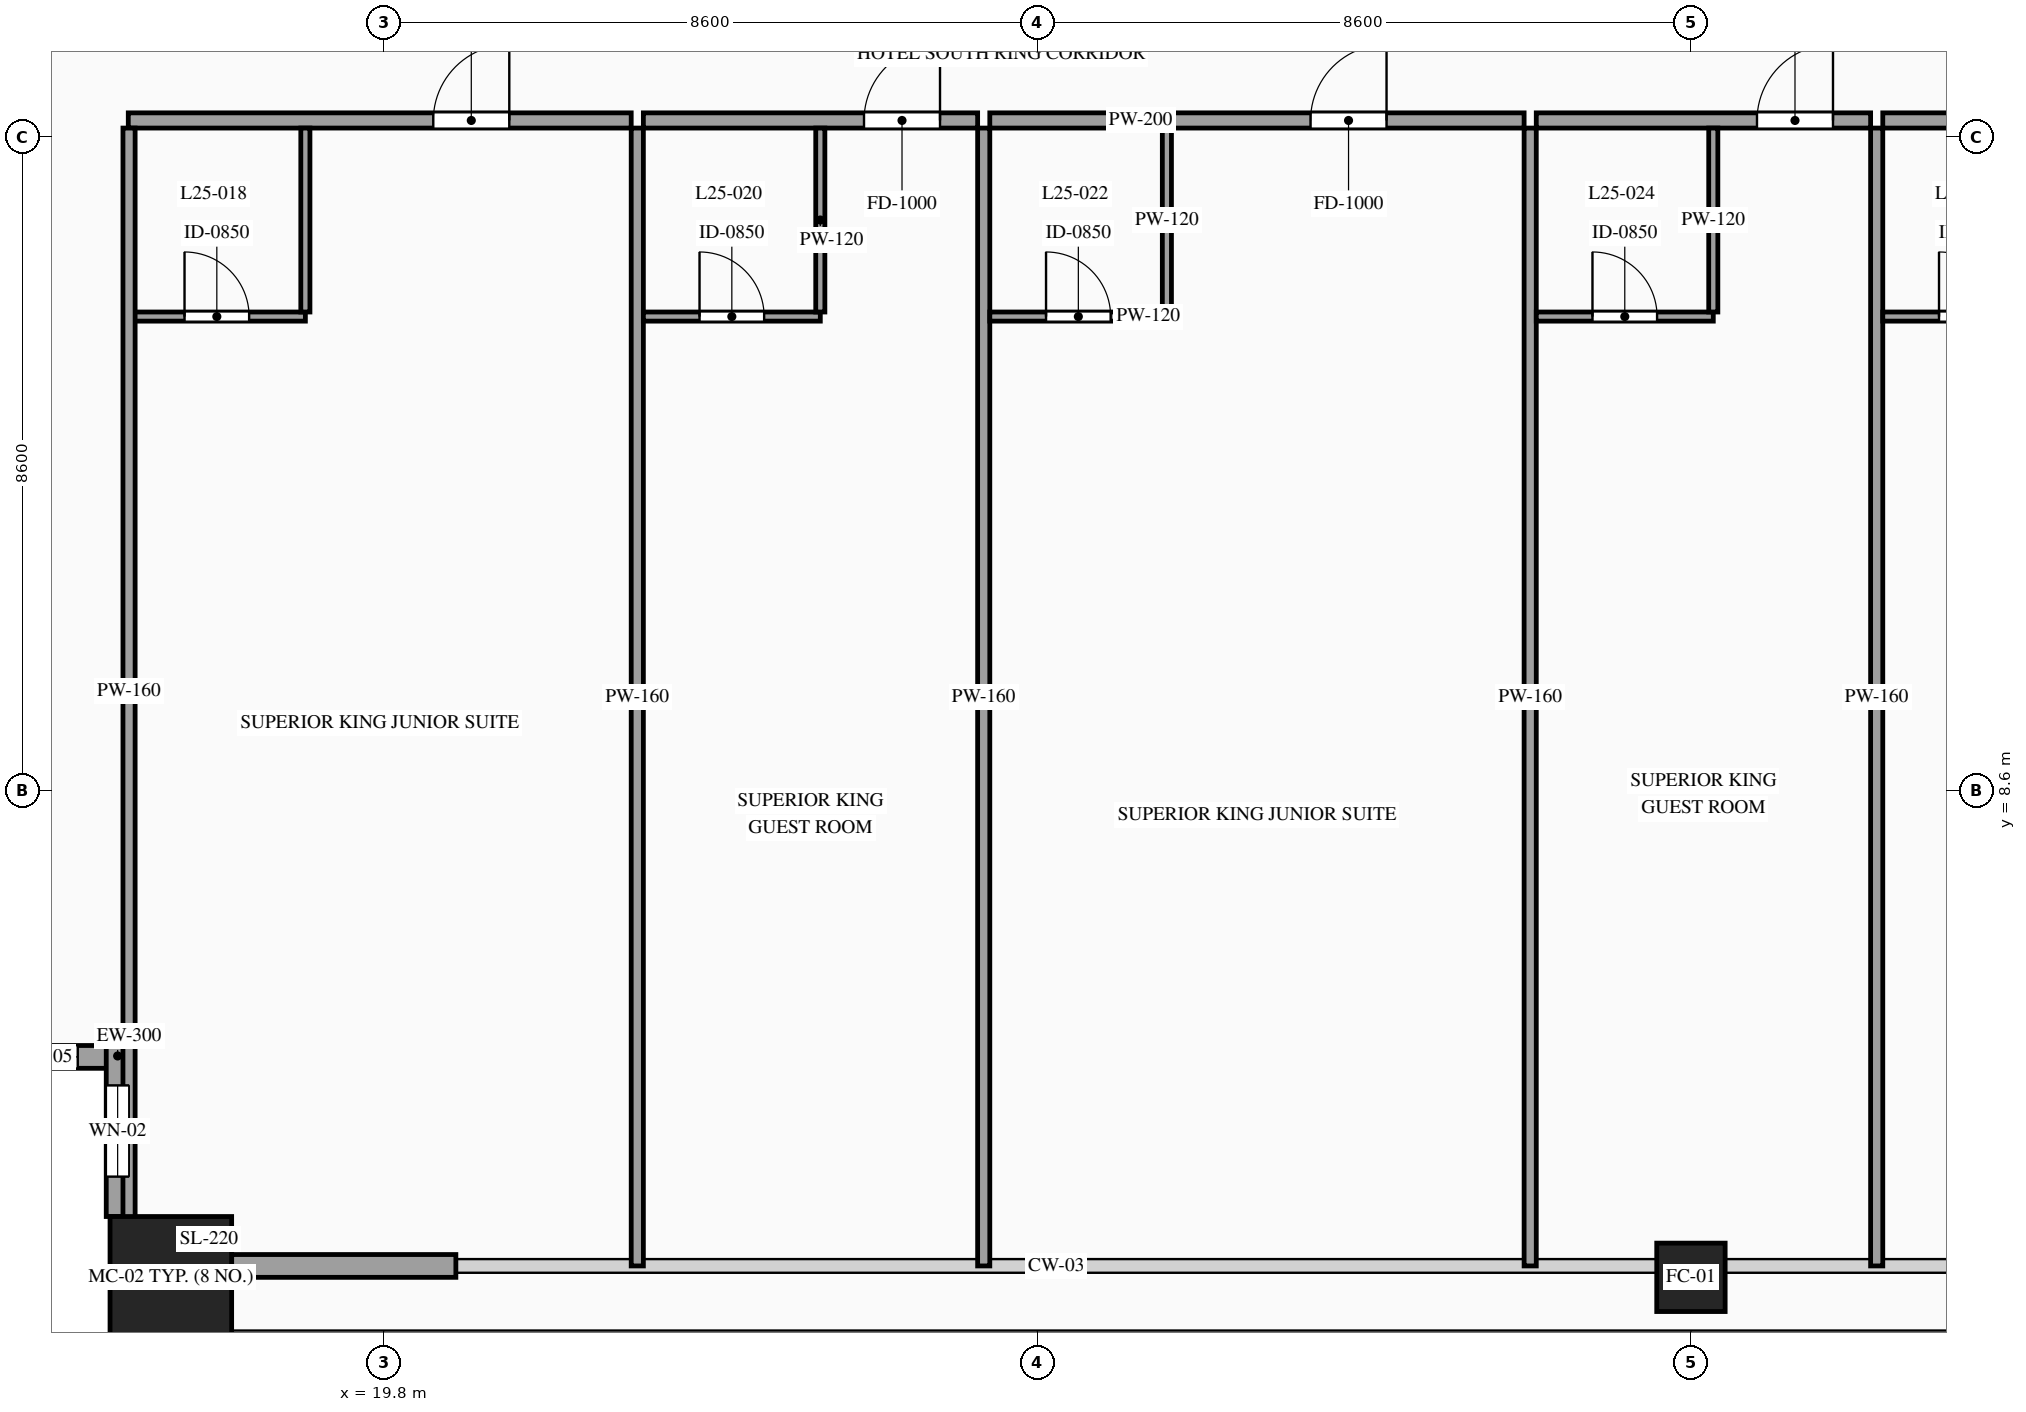
"""IFC4 building model, lengths in metres.
Left out: names, types, materials, properties, quantities, classifications, styles, units other than length and angle.
Written with IfcOpenShell. Run it as: python <this file> out.ifc"""

import sys

from ifc_helpers import new_model, si_unit, direction, frame, frame_2d, origin, origin_2d, place, context, subcontext, project, spatial, rectangle, hollow_rectangle, extrude, source, transform, mapped, element, fill, save


model = new_model("IFC4")
c1 = context("Model", 3, precision=1e-05, world=origin(), true_north=direction((0.0, 1.0)))
c2 = subcontext(c1, "Body", "Model", "MODEL_VIEW")
j1 = project(units=[si_unit("LENGTHUNIT", "METRE"), si_unit("PLANEANGLEUNIT", "RADIAN")], contexts=[c1])
p1 = place(None, origin())
s1 = spatial("IfcSite", under=j1, at=p1, CompositionType="ELEMENT")
p2 = place(p1, origin())
s2 = spatial("IfcBuilding", under=s1, at=p2, CompositionType="ELEMENT")
p3 = place(p2, frame((0.0, 0.0, 97.4)))
s3 = spatial("IfcBuildingStorey", under=s2, at=p3, CompositionType="ELEMENT", Elevation=97.4)
m1 = source(origin(), c2, "Body", "SweptSolid", [
    extrude(hollow_rectangle(XDim=1.6, YDim=1.6, WallThickness=0.07, at=origin_2d()), origin(), (0.0, 0.0, 1.0), 3.6),
])
p4 = place(p3, frame((17.0, 2.2, 0.0), z_axis=(0.0, 0.0, 1.0), x_axis=(1.0, 0.0, 0.0)))
e1 = element("IfcColumn", 1, at=p4, inside=s3, PredefinedType="COLUMN", context=c2, shape_type="MappedRepresentation", body=[
    mapped(m1, transform((0.0, 0.0, 0.0), scale=1.0)),
])
m2 = source(origin(), c2, "Body", "SweptSolid", [
    extrude(hollow_rectangle(XDim=0.9, YDim=0.9, WallThickness=0.042, at=origin_2d()), origin(), (0.0, 0.0, 1.0), 3.6),
])
p5 = place(p3, frame((37.0, 2.2, 0.0), z_axis=(0.0, 0.0, 1.0), x_axis=(1.0, 0.0, 0.0)))
e2 = element("IfcColumn", 2, at=p5, inside=s3, PredefinedType="COLUMN", context=c2, shape_type="MappedRepresentation", body=[
    mapped(m2, transform((0.0, 0.0, 0.0), scale=1.0)),
])
p6 = place(p3, frame((14.2, 5.1, 0.0), z_axis=(0.0, 0.0, 1.0), x_axis=(1.0, 0.0, 0.0)))
e3 = element("IfcWall", 3, at=p6, inside=s3, PredefinedType="SOLIDWALL", context=c2, shape_type="SweptSolid", body=[
    extrude(rectangle(XDim=2.25, YDim=0.3, at=frame_2d((1.125, 0.0))), origin(), (0.0, 0.0, 1.0), 3.38),
])
p7 = place(p6, frame((0.675, 0.0, 0.85)))
e4 = element("IfcOpeningElement", 4, at=p7, cuts=e3, PredefinedType="OPENING", context=c2, shape_type="SweptSolid", body=[
    extrude(rectangle(XDim=0.9, YDim=1.5, at=frame_2d((0.45, 0.75))), frame((0.0, 0.165, 0.0), z_axis=(0.0, -1.0, 0.0), x_axis=(1.0, 0.0, 0.0)), (0.0, 0.0, 1.0), 0.33),
])
p8 = place(p3, frame((16.3, 5.25, 0.0), z_axis=(0.0, 0.0, 1.0), x_axis=(0.0, -1.0, 0.0)))
e5 = element("IfcWall", 5, at=p8, inside=s3, PredefinedType="SOLIDWALL", context=c2, shape_type="SweptSolid", body=[
    extrude(rectangle(XDim=2.25, YDim=0.3, at=frame_2d((1.125, 0.0))), origin(), (0.0, 0.0, 1.0), 3.38),
])
p9 = place(p8, frame((0.525, 0.0, 0.85)))
e6 = element("IfcOpeningElement", 6, at=p9, cuts=e5, PredefinedType="OPENING", context=c2, shape_type="SweptSolid", body=[
    extrude(rectangle(XDim=1.2, YDim=2.1, at=frame_2d((0.6, 1.05))), frame((0.0, 0.165, 0.0), z_axis=(0.0, -1.0, 0.0), x_axis=(1.0, 0.0, 0.0)), (0.0, 0.0, 1.0), 0.33),
])
m3 = source(origin(), c2, "Body", "SweptSolid", [
    extrude(rectangle(XDim=2.95, YDim=0.3, at=frame_2d((1.475, 0.0))), origin(), (0.0, 0.0, 1.0), 2.775),
])
p10 = place(p3, frame((17.8, 2.35, 0.0), z_axis=(0.0, 0.0, 1.0), x_axis=(1.0, 0.0, 0.0)))
e7 = element("IfcWall", 7, at=p10, inside=s3, PredefinedType="SOLIDWALL", context=c2, shape_type="MappedRepresentation", body=[
    mapped(m3, transform((0.0, 0.0, 0.0), scale=1.0)),
])
p11 = place(p3, frame((16.44, 17.42, 0.0), z_axis=(0.0, 0.0, 1.0), x_axis=(1.0, 0.0, 0.0)))
e8 = element("IfcWall", 8, at=p11, inside=s3, PredefinedType="PARTITIONING", context=c2, shape_type="SweptSolid", body=[
    extrude(rectangle(XDim=6.617, YDim=0.2, at=frame_2d((3.309, 0.0))), origin(), (0.0, 0.0, 1.0), 3.38),
])
p12 = place(p11, frame((4.013, 0.0, 0.0)))
e9 = element("IfcOpeningElement", 9, at=p12, cuts=e8, PredefinedType="OPENING", context=c2, shape_type="SweptSolid", body=[
    extrude(rectangle(XDim=1.0, YDim=2.2, at=frame_2d((0.5, 1.1))), frame((0.0, 0.115, 0.0), z_axis=(0.0, -1.0, 0.0), x_axis=(1.0, 0.0, 0.0)), (0.0, 0.0, 1.0), 0.23),
])
m4 = source(origin(), c2, "Body", "SweptSolid", [
    extrude(rectangle(XDim=14.97, YDim=0.16, at=frame_2d((7.485, 0.0))), origin(), (0.0, 0.0, 1.0), 3.38),
])
p13 = place(p3, frame((23.137, 2.35, 0.0), z_axis=(0.0, 0.0, 1.0), x_axis=(0.0, 1.0, 0.0)))
e10 = element("IfcWall", 10, at=p13, inside=s3, PredefinedType="PARTITIONING", context=c2, shape_type="MappedRepresentation", body=[
    mapped(m4, transform((0.0, 0.0, 0.0), scale=1.0)),
])
p14 = place(p3, frame((16.44, 14.84, 0.0), z_axis=(0.0, 0.0, 1.0), x_axis=(1.0, 0.0, 0.0)))
e11 = element("IfcWall", 11, at=p14, inside=s3, PredefinedType="PARTITIONING", context=c2, shape_type="SweptSolid", body=[
    extrude(rectangle(XDim=2.33, YDim=0.12, at=frame_2d((1.165, 0.0))), origin(), (0.0, 0.0, 1.0), 3.38),
])
p15 = place(p14, frame((0.74, 0.0, 0.0)))
e12 = element("IfcOpeningElement", 12, at=p15, cuts=e11, PredefinedType="OPENING", context=c2, shape_type="SweptSolid", body=[
    extrude(rectangle(XDim=0.85, YDim=2.1, at=frame_2d((0.425, 1.05))), frame((0.0, 0.075, 0.0), z_axis=(0.0, -1.0, 0.0), x_axis=(1.0, 0.0, 0.0)), (0.0, 0.0, 1.0), 0.15),
])
m5 = source(origin(), c2, "Body", "SweptSolid", [
    extrude(rectangle(XDim=2.42, YDim=0.12, at=frame_2d((1.21, 0.0))), origin(), (0.0, 0.0, 1.0), 3.38),
])
p16 = place(p3, frame((18.77, 14.9, 0.0), z_axis=(0.0, 0.0, 1.0), x_axis=(0.0, 1.0, 0.0)))
e13 = element("IfcWall", 13, at=p16, inside=s3, PredefinedType="PARTITIONING", context=c2, shape_type="MappedRepresentation", body=[
    mapped(m5, transform((0.0, 0.0, 0.0), scale=1.0)),
])
p17 = place(p3, frame((23.217, 17.42, 0.0), z_axis=(0.0, 0.0, 1.0), x_axis=(1.0, 0.0, 0.0)))
e14 = element("IfcWall", 14, at=p17, inside=s3, PredefinedType="PARTITIONING", context=c2, shape_type="SweptSolid", body=[
    extrude(rectangle(XDim=4.398, YDim=0.2, at=frame_2d((2.199, 0.0))), origin(), (0.0, 0.0, 1.0), 3.38),
])
p18 = place(p17, frame((2.903, 0.0, 0.0)))
e15 = element("IfcOpeningElement", 15, at=p18, cuts=e14, PredefinedType="OPENING", context=c2, shape_type="SweptSolid", body=[
    extrude(rectangle(XDim=1.0, YDim=2.2, at=frame_2d((0.5, 1.1))), frame((0.0, 0.115, 0.0), z_axis=(0.0, -1.0, 0.0), x_axis=(1.0, 0.0, 0.0)), (0.0, 0.0, 1.0), 0.23),
])
p19 = place(p3, frame((27.695, 2.35, 0.0), z_axis=(0.0, 0.0, 1.0), x_axis=(0.0, 1.0, 0.0)))
e16 = element("IfcWall", 16, at=p19, inside=s3, PredefinedType="PARTITIONING", context=c2, shape_type="MappedRepresentation", body=[
    mapped(m4, transform((0.0, 0.0, 0.0), scale=1.0)),
])
p20 = place(p3, frame((23.217, 14.84, 0.0), z_axis=(0.0, 0.0, 1.0), x_axis=(1.0, 0.0, 0.0)))
e17 = element("IfcWall", 17, at=p20, inside=s3, PredefinedType="PARTITIONING", context=c2, shape_type="SweptSolid", body=[
    extrude(rectangle(XDim=2.328, YDim=0.12, at=frame_2d((1.164, 0.0))), origin(), (0.0, 0.0, 1.0), 3.38),
])
p21 = place(p20, frame((0.739, 0.0, 0.0)))
e18 = element("IfcOpeningElement", 18, at=p21, cuts=e17, PredefinedType="OPENING", context=c2, shape_type="SweptSolid", body=[
    extrude(rectangle(XDim=0.85, YDim=2.1, at=frame_2d((0.425, 1.05))), frame((0.0, 0.075, 0.0), z_axis=(0.0, -1.0, 0.0), x_axis=(1.0, 0.0, 0.0)), (0.0, 0.0, 1.0), 0.15),
])
p22 = place(p3, frame((25.545, 14.9, 0.0), z_axis=(0.0, 0.0, 1.0), x_axis=(0.0, 1.0, 0.0)))
e19 = element("IfcWall", 19, at=p22, inside=s3, PredefinedType="PARTITIONING", context=c2, shape_type="MappedRepresentation", body=[
    mapped(m5, transform((0.0, 0.0, 0.0), scale=1.0)),
])
p23 = place(p3, frame((27.775, 17.42, 0.0), z_axis=(0.0, 0.0, 1.0), x_axis=(1.0, 0.0, 0.0)))
e20 = element("IfcWall", 20, at=p23, inside=s3, PredefinedType="PARTITIONING", context=c2, shape_type="SweptSolid", body=[
    extrude(rectangle(XDim=7.03, YDim=0.2, at=frame_2d((3.515, 0.0))), origin(), (0.0, 0.0, 1.0), 3.38),
])
p24 = place(p23, frame((4.22, 0.0, 0.0)))
e21 = element("IfcOpeningElement", 21, at=p24, cuts=e20, PredefinedType="OPENING", context=c2, shape_type="SweptSolid", body=[
    extrude(rectangle(XDim=1.0, YDim=2.2, at=frame_2d((0.5, 1.1))), frame((0.0, 0.115, 0.0), z_axis=(0.0, -1.0, 0.0), x_axis=(1.0, 0.0, 0.0)), (0.0, 0.0, 1.0), 0.23),
])
p25 = place(p3, frame((34.885, 2.35, 0.0), z_axis=(0.0, 0.0, 1.0), x_axis=(0.0, 1.0, 0.0)))
e22 = element("IfcWall", 22, at=p25, inside=s3, PredefinedType="PARTITIONING", context=c2, shape_type="MappedRepresentation", body=[
    mapped(m4, transform((0.0, 0.0, 0.0), scale=1.0)),
])
p26 = place(p3, frame((27.775, 14.84, 0.0), z_axis=(0.0, 0.0, 1.0), x_axis=(1.0, 0.0, 0.0)))
e23 = element("IfcWall", 23, at=p26, inside=s3, PredefinedType="PARTITIONING", context=c2, shape_type="SweptSolid", body=[
    extrude(rectangle(XDim=2.33, YDim=0.12, at=frame_2d((1.165, 0.0))), origin(), (0.0, 0.0, 1.0), 3.38),
])
p27 = place(p26, frame((0.74, 0.0, 0.0)))
e24 = element("IfcOpeningElement", 24, at=p27, cuts=e23, PredefinedType="OPENING", context=c2, shape_type="SweptSolid", body=[
    extrude(rectangle(XDim=0.85, YDim=2.1, at=frame_2d((0.425, 1.05))), frame((0.0, 0.075, 0.0), z_axis=(0.0, -1.0, 0.0), x_axis=(1.0, 0.0, 0.0)), (0.0, 0.0, 1.0), 0.15),
])
p28 = place(p3, frame((30.105, 14.9, 0.0), z_axis=(0.0, 0.0, 1.0), x_axis=(0.0, 1.0, 0.0)))
e25 = element("IfcWall", 25, at=p28, inside=s3, PredefinedType="PARTITIONING", context=c2, shape_type="MappedRepresentation", body=[
    mapped(m5, transform((0.0, 0.0, 0.0), scale=1.0)),
])
p29 = place(p3, frame((34.965, 17.42, 0.0), z_axis=(0.0, 0.0, 1.0), x_axis=(1.0, 0.0, 0.0)))
e26 = element("IfcWall", 26, at=p29, inside=s3, PredefinedType="PARTITIONING", context=c2, shape_type="SweptSolid", body=[
    extrude(rectangle(XDim=4.399, YDim=0.2, at=frame_2d((2.199, 0.0))), origin(), (0.0, 0.0, 1.0), 3.38),
])
p30 = place(p29, frame((2.904, 0.0, 0.0)))
e27 = element("IfcOpeningElement", 27, at=p30, cuts=e26, PredefinedType="OPENING", context=c2, shape_type="SweptSolid", body=[
    extrude(rectangle(XDim=1.0, YDim=2.2, at=frame_2d((0.5, 1.1))), frame((0.0, 0.115, 0.0), z_axis=(0.0, -1.0, 0.0), x_axis=(1.0, 0.0, 0.0)), (0.0, 0.0, 1.0), 0.23),
])
p31 = place(p3, frame((39.444, 2.35, 0.0), z_axis=(0.0, 0.0, 1.0), x_axis=(0.0, 1.0, 0.0)))
e28 = element("IfcWall", 28, at=p31, inside=s3, PredefinedType="PARTITIONING", context=c2, shape_type="MappedRepresentation", body=[
    mapped(m4, transform((0.0, 0.0, 0.0), scale=1.0)),
])
p32 = place(p3, frame((34.965, 14.84, 0.0), z_axis=(0.0, 0.0, 1.0), x_axis=(1.0, 0.0, 0.0)))
e29 = element("IfcWall", 29, at=p32, inside=s3, PredefinedType="PARTITIONING", context=c2, shape_type="SweptSolid", body=[
    extrude(rectangle(XDim=2.329, YDim=0.12, at=frame_2d((1.165, 0.0))), origin(), (0.0, 0.0, 1.0), 3.38),
])
p33 = place(p32, frame((0.74, 0.0, 0.0)))
e30 = element("IfcOpeningElement", 30, at=p33, cuts=e29, PredefinedType="OPENING", context=c2, shape_type="SweptSolid", body=[
    extrude(rectangle(XDim=0.85, YDim=2.1, at=frame_2d((0.425, 1.05))), frame((0.0, 0.075, 0.0), z_axis=(0.0, -1.0, 0.0), x_axis=(1.0, 0.0, 0.0)), (0.0, 0.0, 1.0), 0.15),
])
p34 = place(p3, frame((37.294, 14.9, 0.0), z_axis=(0.0, 0.0, 1.0), x_axis=(0.0, 1.0, 0.0)))
e31 = element("IfcWall", 31, at=p34, inside=s3, PredefinedType="PARTITIONING", context=c2, shape_type="MappedRepresentation", body=[
    mapped(m5, transform((0.0, 0.0, 0.0), scale=1.0)),
])
p35 = place(p3, frame((39.524, 17.42, 0.0), z_axis=(0.0, 0.0, 1.0), x_axis=(1.0, 0.0, 0.0)))
e32 = element("IfcWall", 32, at=p35, inside=s3, PredefinedType="PARTITIONING", context=c2, shape_type="SweptSolid", body=[
    extrude(rectangle(XDim=7.03, YDim=0.2, at=frame_2d((3.515, 0.0))), origin(), (0.0, 0.0, 1.0), 3.38),
])
p36 = place(p35, frame((4.22, 0.0, 0.0)))
e33 = element("IfcOpeningElement", 33, at=p36, cuts=e32, PredefinedType="OPENING", context=c2, shape_type="SweptSolid", body=[
    extrude(rectangle(XDim=1.0, YDim=2.2, at=frame_2d((0.5, 1.1))), frame((0.0, 0.115, 0.0), z_axis=(0.0, -1.0, 0.0), x_axis=(1.0, 0.0, 0.0)), (0.0, 0.0, 1.0), 0.23),
])
p37 = place(p3, frame((39.524, 14.84, 0.0), z_axis=(0.0, 0.0, 1.0), x_axis=(1.0, 0.0, 0.0)))
e34 = element("IfcWall", 34, at=p37, inside=s3, PredefinedType="PARTITIONING", context=c2, shape_type="SweptSolid", body=[
    extrude(rectangle(XDim=2.33, YDim=0.12, at=frame_2d((1.165, 0.0))), origin(), (0.0, 0.0, 1.0), 3.38),
])
p38 = place(p37, frame((0.74, 0.0, 0.0)))
e35 = element("IfcOpeningElement", 35, at=p38, cuts=e34, PredefinedType="OPENING", context=c2, shape_type="SweptSolid", body=[
    extrude(rectangle(XDim=0.85, YDim=2.1, at=frame_2d((0.425, 1.05))), frame((0.0, 0.075, 0.0), z_axis=(0.0, -1.0, 0.0), x_axis=(1.0, 0.0, 0.0)), (0.0, 0.0, 1.0), 0.15),
])
m6 = source(origin(), c2, "Body", "SweptSolid", [
    extrude(rectangle(XDim=14.82, YDim=0.16, at=frame_2d((7.41, 0.0))), origin(), (0.0, 0.0, 1.0), 3.38),
])
p39 = place(p3, frame((16.45, 2.5, 0.0), z_axis=(0.0, 0.0, 1.0), x_axis=(0.0, 1.0, 0.0)))
e36 = element("IfcWall", 36, at=p39, inside=s3, PredefinedType="PARTITIONING", context=c2, shape_type="MappedRepresentation", body=[
    mapped(m6, transform((0.0, 0.0, 0.0), scale=1.0)),
])
m7 = source(origin(), c2, "Body", "SweptSolid", [
    extrude(rectangle(XDim=0.9, YDim=1.5, at=frame_2d((0.45, 0.75))), frame((0.0, 0.03, 0.0), z_axis=(0.0, -1.0, 0.0), x_axis=(1.0, 0.0, 0.0)), (0.0, 0.0, 1.0), 0.06),
])
p40 = place(p7, origin())
e37 = element("IfcWindow", 37, at=p40, inside=s3, PartitioningType="SINGLE_PANEL", PredefinedType="WINDOW", context=c2, shape_type="MappedRepresentation", body=[
    mapped(m7, transform((0.0, 0.0, 0.0), scale=1.0)),
])
fill(e4, e37)
m8 = source(origin(), c2, "Body", "SweptSolid", [
    extrude(rectangle(XDim=1.2, YDim=2.1, at=frame_2d((0.6, 1.05))), frame((0.0, 0.03, 0.0), z_axis=(0.0, -1.0, 0.0), x_axis=(1.0, 0.0, 0.0)), (0.0, 0.0, 1.0), 0.06),
])
p41 = place(p9, origin())
e38 = element("IfcWindow", 38, at=p41, inside=s3, PartitioningType="SINGLE_PANEL", PredefinedType="WINDOW", context=c2, shape_type="MappedRepresentation", body=[
    mapped(m8, transform((0.0, 0.0, 0.0), scale=1.0)),
])
fill(e6, e38)
m9 = source(origin(), c2, "Body", "SweptSolid", [
    extrude(rectangle(XDim=1.0, YDim=2.2, at=frame_2d((0.5, 1.1))), frame((0.0, 0.025, 0.0), z_axis=(0.0, -1.0, 0.0), x_axis=(1.0, 0.0, 0.0)), (0.0, 0.0, 1.0), 0.05),
])
p42 = place(p12, origin())
e39 = element("IfcDoor", 39, at=p42, inside=s3, OperationType="SINGLE_SWING_RIGHT", PredefinedType="DOOR", context=c2, shape_type="MappedRepresentation", body=[
    mapped(m9, transform((0.0, 0.0, 0.0), scale=1.0)),
])
fill(e9, e39)
m10 = source(origin(), c2, "Body", "SweptSolid", [
    extrude(rectangle(XDim=0.85, YDim=2.1, at=frame_2d((0.425, 1.05))), frame((0.0, 0.025, 0.0), z_axis=(0.0, -1.0, 0.0), x_axis=(1.0, 0.0, 0.0)), (0.0, 0.0, 1.0), 0.05),
])
p43 = place(p15, origin())
e40 = element("IfcDoor", 40, at=p43, inside=s3, OperationType="SINGLE_SWING_LEFT", PredefinedType="DOOR", context=c2, shape_type="MappedRepresentation", body=[
    mapped(m10, transform((0.0, 0.0, 0.0), scale=1.0)),
])
fill(e12, e40)
p44 = place(p18, origin())
e41 = element("IfcDoor", 41, at=p44, inside=s3, OperationType="SINGLE_SWING_RIGHT", PredefinedType="DOOR", context=c2, shape_type="MappedRepresentation", body=[
    mapped(m9, transform((0.0, 0.0, 0.0), scale=1.0)),
])
fill(e15, e41)
p45 = place(p21, origin())
e42 = element("IfcDoor", 42, at=p45, inside=s3, OperationType="SINGLE_SWING_LEFT", PredefinedType="DOOR", context=c2, shape_type="MappedRepresentation", body=[
    mapped(m10, transform((0.0, 0.0, 0.0), scale=1.0)),
])
fill(e18, e42)
p46 = place(p24, origin())
e43 = element("IfcDoor", 43, at=p46, inside=s3, OperationType="SINGLE_SWING_RIGHT", PredefinedType="DOOR", context=c2, shape_type="MappedRepresentation", body=[
    mapped(m9, transform((0.0, 0.0, 0.0), scale=1.0)),
])
fill(e21, e43)
p47 = place(p27, origin())
e44 = element("IfcDoor", 44, at=p47, inside=s3, OperationType="SINGLE_SWING_LEFT", PredefinedType="DOOR", context=c2, shape_type="MappedRepresentation", body=[
    mapped(m10, transform((0.0, 0.0, 0.0), scale=1.0)),
])
fill(e24, e44)
p48 = place(p30, origin())
e45 = element("IfcDoor", 45, at=p48, inside=s3, OperationType="SINGLE_SWING_RIGHT", PredefinedType="DOOR", context=c2, shape_type="MappedRepresentation", body=[
    mapped(m9, transform((0.0, 0.0, 0.0), scale=1.0)),
])
fill(e27, e45)
p49 = place(p33, origin())
e46 = element("IfcDoor", 46, at=p49, inside=s3, OperationType="SINGLE_SWING_LEFT", PredefinedType="DOOR", context=c2, shape_type="MappedRepresentation", body=[
    mapped(m10, transform((0.0, 0.0, 0.0), scale=1.0)),
])
fill(e30, e46)
p50 = place(p38, origin())
e47 = element("IfcDoor", 47, at=p50, inside=s3, OperationType="SINGLE_SWING_LEFT", PredefinedType="DOOR", context=c2, shape_type="MappedRepresentation", body=[
    mapped(m10, transform((0.0, 0.0, 0.0), scale=1.0)),
])
fill(e35, e47)
save(model, sys.argv[1])
